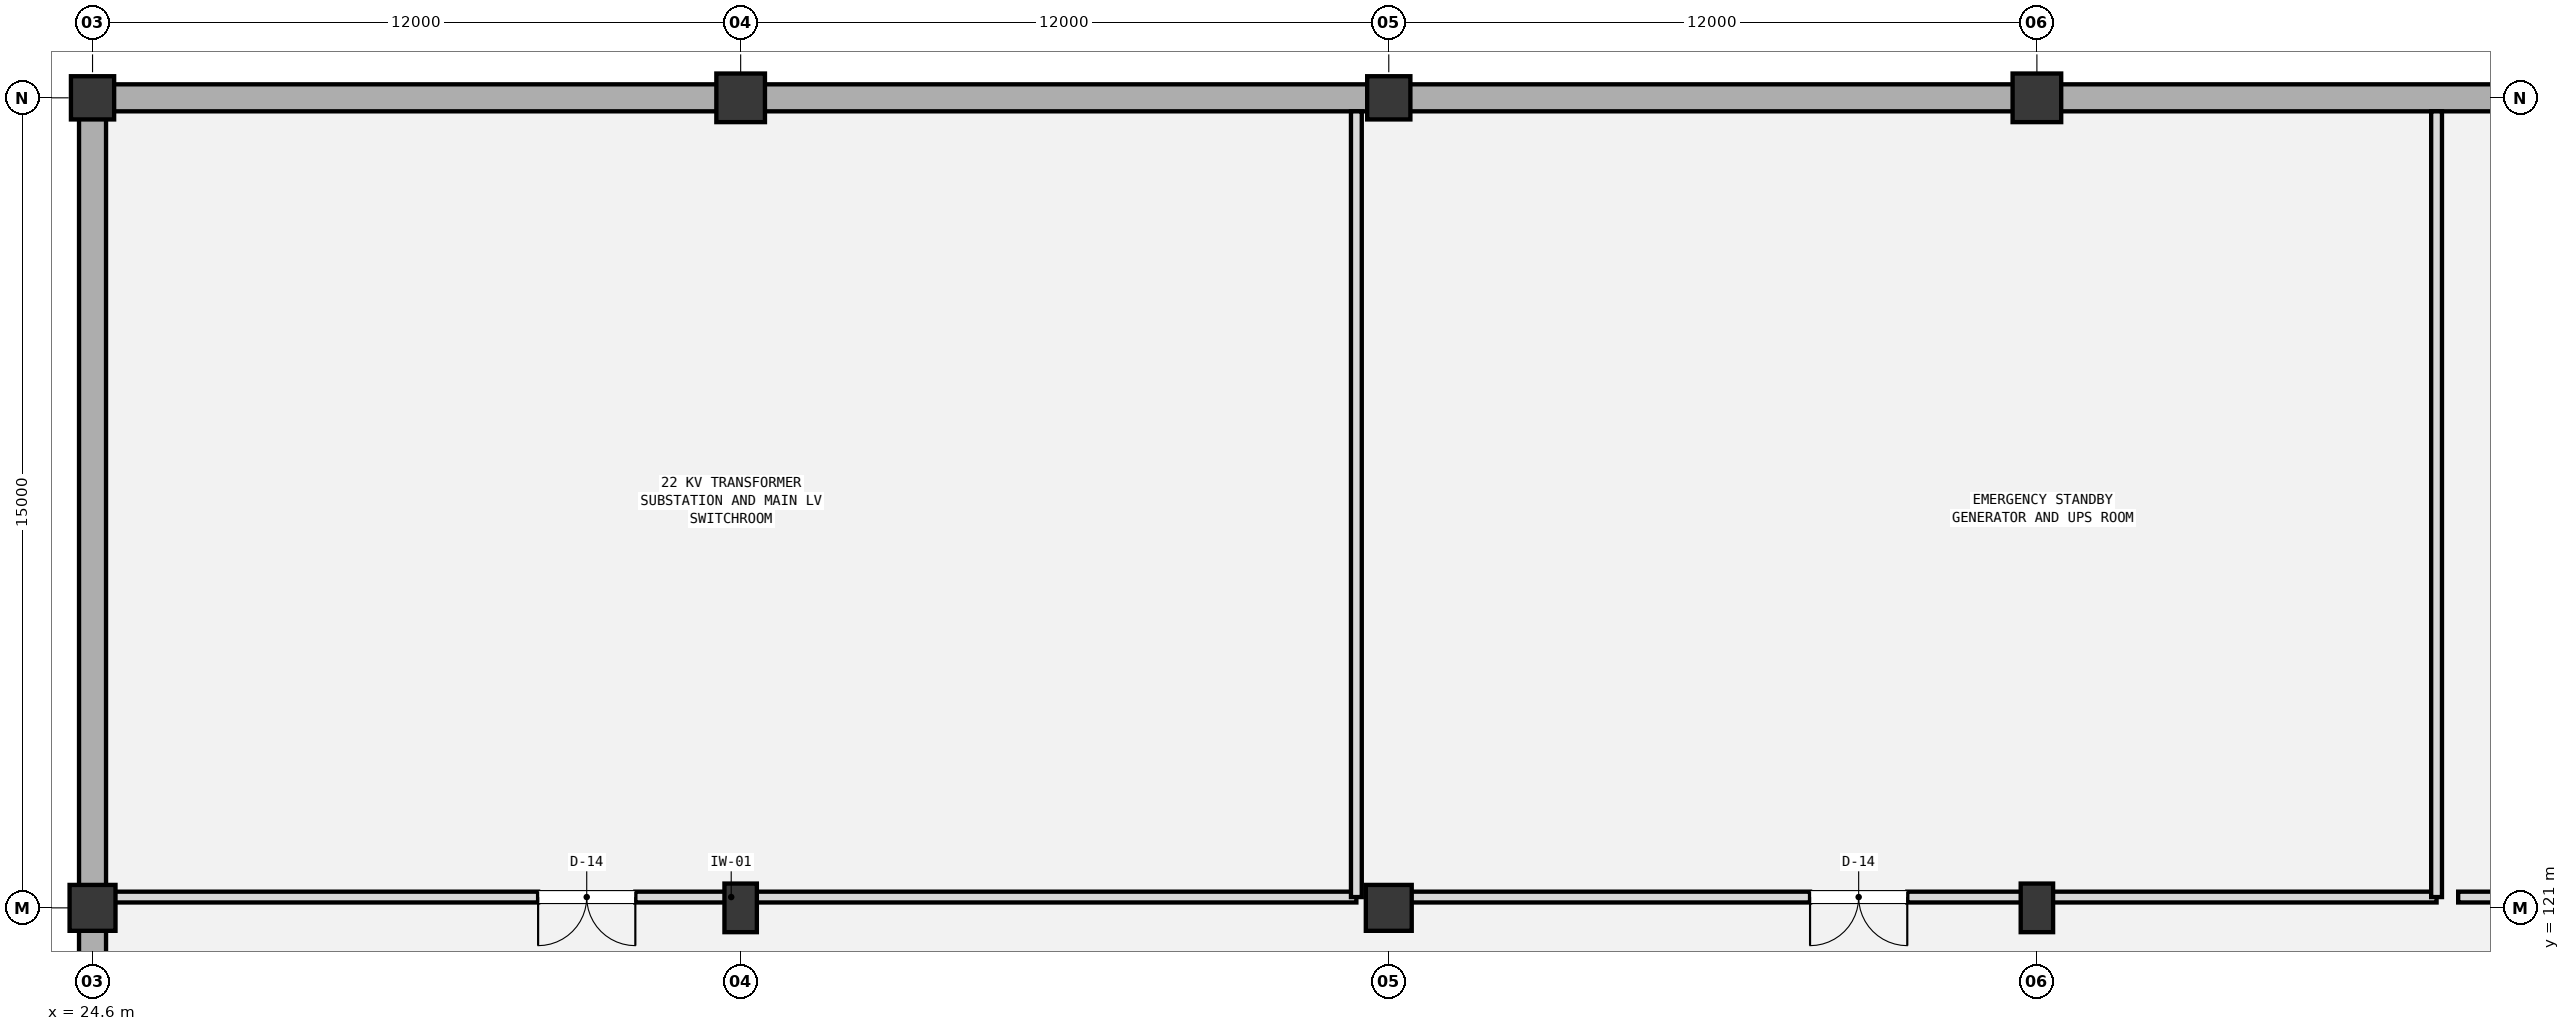
"""IFC4 building model, lengths in metres.
Left out: names, types, materials, properties, quantities, classifications, styles, units other than length and angle.
Written with IfcOpenShell. Run it as: python <this file> out.ifc"""

import sys

from ifc_helpers import new_model, si_unit, direction, frame, frame_2d, origin, origin_2d, place, context, subcontext, project, spatial, rectangle, extrude, element, fill, save


model = new_model("IFC4")
c1 = context("Model", 3, precision=1e-05, world=origin(), true_north=direction((0.0, 1.0)))
c2 = subcontext(c1, "Body", "Model", "MODEL_VIEW")
j1 = project(units=[si_unit("LENGTHUNIT", "METRE"), si_unit("PLANEANGLEUNIT", "RADIAN")], contexts=[c1])
p1 = place(None, origin())
s1 = spatial("IfcSite", under=j1, at=p1, CompositionType="ELEMENT")
p2 = place(p1, origin())
s2 = spatial("IfcBuilding", under=s1, at=p2, CompositionType="ELEMENT")
p3 = place(p2, frame((0.0, 0.0, -5.4)))
s3 = spatial("IfcBuildingStorey", under=s2, at=p3, CompositionType="ELEMENT", Elevation=-5.4)
p4 = place(p3, frame((156.0, 136.0, 0.0), z_axis=(0.0, 0.0, 1.0), x_axis=(-1.0, 0.0, 0.0)))
e1 = element("IfcWall", 1, at=p4, inside=s3, PredefinedType="USERDEFINED", context=c2, shape_type="SweptSolid", body=[
    extrude(rectangle(XDim=131.4, YDim=0.5, at=frame_2d((65.7, 0.0))), origin(), (0.0, 0.0, 1.0), 4.98),
])
p5 = place(p3, frame((24.6, 121.0, -0.55), z_axis=(0.0, 0.0, 1.0), x_axis=(1.0, 0.0, 0.0)))
e2 = element("IfcColumn", 2, at=p5, inside=s3, PredefinedType="COLUMN", context=c2, shape_type="SweptSolid", body=[
    extrude(rectangle(XDim=0.85, YDim=0.85, at=origin_2d()), origin(), (0.0, 0.0, 1.0), 5.95),
])
p6 = place(p3, frame((24.6, 136.0, -0.55), z_axis=(0.0, 0.0, 1.0), x_axis=(1.0, 0.0, 0.0)))
e3 = element("IfcColumn", 3, at=p6, inside=s3, PredefinedType="COLUMN", context=c2, shape_type="SweptSolid", body=[
    extrude(rectangle(XDim=0.8, YDim=0.8, at=origin_2d()), origin(), (0.0, 0.0, 1.0), 5.95),
])
p7 = place(p3, frame((36.6, 121.0, -0.55), z_axis=(0.0, 0.0, 1.0), x_axis=(1.0, 0.0, 0.0)))
e4 = element("IfcColumn", 4, at=p7, inside=s3, PredefinedType="COLUMN", context=c2, shape_type="SweptSolid", body=[
    extrude(rectangle(XDim=0.6, YDim=0.9, at=origin_2d()), origin(), (0.0, 0.0, 1.0), 5.95),
])
p8 = place(p3, frame((36.6, 136.0, -0.55), z_axis=(0.0, 0.0, 1.0), x_axis=(1.0, 0.0, 0.0)))
e5 = element("IfcColumn", 5, at=p8, inside=s3, PredefinedType="COLUMN", context=c2, shape_type="SweptSolid", body=[
    extrude(rectangle(XDim=0.9, YDim=0.9, at=origin_2d()), origin(), (0.0, 0.0, 1.0), 5.95),
])
p9 = place(p3, frame((48.6, 121.0, -0.55), z_axis=(0.0, 0.0, 1.0), x_axis=(1.0, 0.0, 0.0)))
e6 = element("IfcColumn", 6, at=p9, inside=s3, PredefinedType="COLUMN", context=c2, shape_type="SweptSolid", body=[
    extrude(rectangle(XDim=0.85, YDim=0.85, at=origin_2d()), origin(), (0.0, 0.0, 1.0), 5.95),
])
p10 = place(p3, frame((48.6, 136.0, -0.55), z_axis=(0.0, 0.0, 1.0), x_axis=(1.0, 0.0, 0.0)))
e7 = element("IfcColumn", 7, at=p10, inside=s3, PredefinedType="COLUMN", context=c2, shape_type="SweptSolid", body=[
    extrude(rectangle(XDim=0.8, YDim=0.8, at=origin_2d()), origin(), (0.0, 0.0, 1.0), 5.95),
])
p11 = place(p3, frame((60.6, 121.0, -0.55), z_axis=(0.0, 0.0, 1.0), x_axis=(1.0, 0.0, 0.0)))
e8 = element("IfcColumn", 8, at=p11, inside=s3, PredefinedType="COLUMN", context=c2, shape_type="SweptSolid", body=[
    extrude(rectangle(XDim=0.6, YDim=0.9, at=origin_2d()), origin(), (0.0, 0.0, 1.0), 5.95),
])
p12 = place(p3, frame((60.6, 136.0, -0.55), z_axis=(0.0, 0.0, 1.0), x_axis=(1.0, 0.0, 0.0)))
e9 = element("IfcColumn", 9, at=p12, inside=s3, PredefinedType="COLUMN", context=c2, shape_type="SweptSolid", body=[
    extrude(rectangle(XDim=0.9, YDim=0.9, at=origin_2d()), origin(), (0.0, 0.0, 1.0), 5.95),
])
p13 = place(p3, frame((24.6, 108.6, 0.0), z_axis=(0.0, 0.0, 1.0), x_axis=(0.0, 1.0, 0.0)))
e10 = element("IfcWall", 10, at=p13, inside=s3, PredefinedType="USERDEFINED", context=c2, shape_type="SweptSolid", body=[
    extrude(rectangle(XDim=27.4, YDim=0.5, at=frame_2d((13.7, 0.0))), origin(), (0.0, 0.0, 1.0), 4.38),
])
p14 = place(p3, frame((24.85, 121.2, 0.0), z_axis=(0.0, 0.0, 1.0), x_axis=(1.0, 0.0, 0.0)))
e11 = element("IfcWall", 11, at=p14, inside=s3, PredefinedType="SOLIDWALL", context=c2, shape_type="SweptSolid", body=[
    extrude(rectangle(XDim=23.15, YDim=0.2, at=frame_2d((11.575, 0.0))), origin(), (0.0, 0.0, 1.0), 3.8),
])
p15 = place(p14, frame((8.0, 0.0, 0.0)))
e12 = element("IfcOpeningElement", 12, at=p15, cuts=e11, PredefinedType="OPENING", context=c2, shape_type="SweptSolid", body=[
    extrude(rectangle(XDim=1.8, YDim=2.4, at=frame_2d((0.9, 1.2))), frame((0.0, 0.11, 0.0), z_axis=(0.0, -1.0, 0.0), x_axis=(1.0, 0.0, 0.0)), (0.0, 0.0, 1.0), 0.22),
])
p16 = place(p3, frame((48.0, 121.2, 0.0), z_axis=(0.0, 0.0, 1.0), x_axis=(0.0, 1.0, 0.0)))
e13 = element("IfcWall", 13, at=p16, inside=s3, PredefinedType="SOLIDWALL", context=c2, shape_type="SweptSolid", body=[
    extrude(rectangle(XDim=14.55, YDim=0.2, at=frame_2d((7.275, 0.0))), origin(), (0.0, 0.0, 1.0), 3.8),
])
p17 = place(p3, frame((48.4, 121.2, 0.0), z_axis=(0.0, 0.0, 1.0), x_axis=(1.0, 0.0, 0.0)))
e14 = element("IfcWall", 14, at=p17, inside=s3, PredefinedType="SOLIDWALL", context=c2, shape_type="SweptSolid", body=[
    extrude(rectangle(XDim=19.6, YDim=0.2, at=frame_2d((9.8, 0.0))), origin(), (0.0, 0.0, 1.0), 3.8),
])
p18 = place(p17, frame((8.0, 0.0, 0.0)))
e15 = element("IfcOpeningElement", 15, at=p18, cuts=e14, PredefinedType="OPENING", context=c2, shape_type="SweptSolid", body=[
    extrude(rectangle(XDim=1.8, YDim=2.4, at=frame_2d((0.9, 1.2))), frame((0.0, 0.11, 0.0), z_axis=(0.0, -1.0, 0.0), x_axis=(1.0, 0.0, 0.0)), (0.0, 0.0, 1.0), 0.22),
])
p19 = place(p3, frame((68.0, 121.2, 0.0), z_axis=(0.0, 0.0, 1.0), x_axis=(0.0, 1.0, 0.0)))
e16 = element("IfcWall", 16, at=p19, inside=s3, PredefinedType="SOLIDWALL", context=c2, shape_type="SweptSolid", body=[
    extrude(rectangle(XDim=14.55, YDim=0.2, at=frame_2d((7.275, 0.0))), origin(), (0.0, 0.0, 1.0), 3.8),
])
p20 = place(p3, frame((68.4, 121.2, 0.0), z_axis=(0.0, 0.0, 1.0), x_axis=(1.0, 0.0, 0.0)))
e17 = element("IfcWall", 17, at=p20, inside=s3, PredefinedType="SOLIDWALL", context=c2, shape_type="SweptSolid", body=[
    extrude(rectangle(XDim=19.6, YDim=0.2, at=frame_2d((9.8, 0.0))), origin(), (0.0, 0.0, 1.0), 3.8),
])
p21 = place(p20, frame((8.0, 0.0, 0.0)))
e18 = element("IfcOpeningElement", 18, at=p21, cuts=e17, PredefinedType="OPENING", context=c2, shape_type="SweptSolid", body=[
    extrude(rectangle(XDim=1.8, YDim=2.4, at=frame_2d((0.9, 1.2))), frame((0.0, 0.11, 0.0), z_axis=(0.0, -1.0, 0.0), x_axis=(1.0, 0.0, 0.0)), (0.0, 0.0, 1.0), 0.22),
])
p22 = place(p15, frame((1.8, 0.0, 0.0), z_axis=(0.0, 0.0, 1.0), x_axis=(-1.0, 0.0, 0.0)))
e19 = element("IfcDoor", 19, at=p22, inside=s3, OperationType="DOUBLE_DOOR_SINGLE_SWING", PredefinedType="DOOR", context=c2, shape_type="SweptSolid", body=[
    extrude(rectangle(XDim=1.8, YDim=2.4, at=frame_2d((0.9, 1.2))), frame((0.0, 0.025, 0.0), z_axis=(0.0, -1.0, 0.0), x_axis=(1.0, 0.0, 0.0)), (0.0, 0.0, 1.0), 0.05),
])
fill(e12, e19)
p23 = place(p18, frame((1.8, 0.0, 0.0), z_axis=(0.0, 0.0, 1.0), x_axis=(-1.0, 0.0, 0.0)))
e20 = element("IfcDoor", 20, at=p23, inside=s3, OperationType="DOUBLE_DOOR_SINGLE_SWING", PredefinedType="DOOR", context=c2, shape_type="SweptSolid", body=[
    extrude(rectangle(XDim=1.8, YDim=2.4, at=frame_2d((0.9, 1.2))), frame((0.0, 0.025, 0.0), z_axis=(0.0, -1.0, 0.0), x_axis=(1.0, 0.0, 0.0)), (0.0, 0.0, 1.0), 0.05),
])
fill(e15, e20)
save(model, sys.argv[1])
